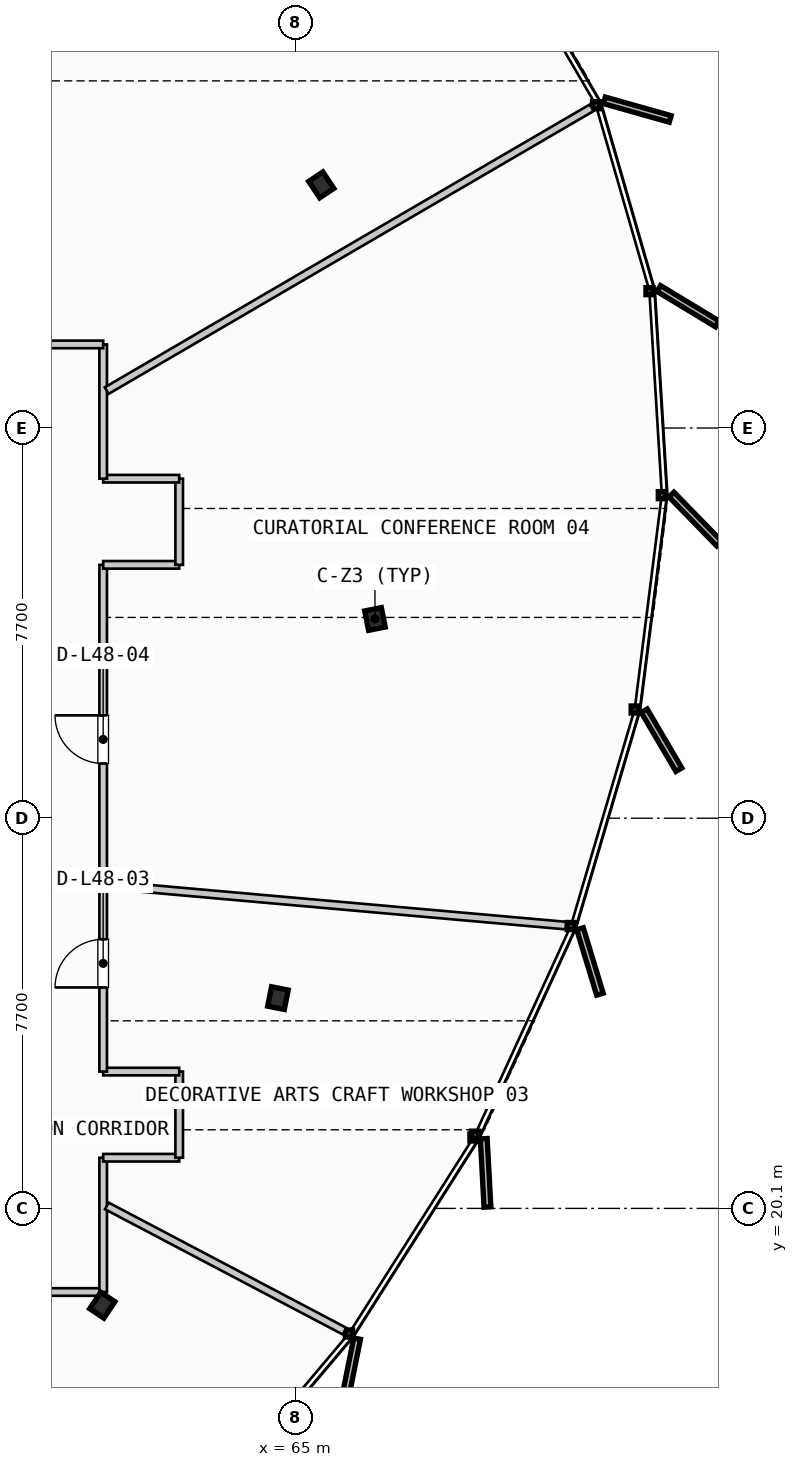
"""IFC4 building model, lengths in metres.
Left out: names, types, materials, properties, quantities, classifications, styles, units other than length and angle.
Written with IfcOpenShell. Run it as: python <this file> out.ifc"""

import sys

from ifc_helpers import new_model, si_unit, direction, frame, frame_2d, origin, origin_2d, place, context, subcontext, project, spatial, rectangle, i_section, extrude, source, transform, mapped, element, fill, save


model = new_model("IFC4")
c1 = context("Model", 3, precision=1e-05, world=origin(), true_north=direction((0.0, 1.0)))
c2 = subcontext(c1, "Body", "Model", "MODEL_VIEW")
j1 = project(units=[si_unit("LENGTHUNIT", "METRE"), si_unit("PLANEANGLEUNIT", "RADIAN")], contexts=[c1])
p1 = place(None, origin())
s1 = spatial("IfcSite", under=j1, at=p1, CompositionType="ELEMENT")
p2 = place(p1, origin())
s2 = spatial("IfcBuilding", under=s1, at=p2, CompositionType="ELEMENT")
p3 = place(p2, frame((0.0, 0.0, 186.9)))
s3 = spatial("IfcBuildingStorey", under=s2, at=p3, CompositionType="ELEMENT", Elevation=186.9)
m1 = source(origin(), c2, "Body", "SweptSolid", [
    extrude(i_section(OverallWidth=0.391, OverallDepth=0.335, WebThickness=0.023, FlangeThickness=0.034, FilletRadius=0.015, at=origin_2d()), origin(), (0.0, 0.0, 1.0), 3.26),
])
for number, where, z_axis, x_axis in (
    (1, (66.564, 31.731, 0.0), (0.0, 0.0, 1.0), (0.981, 0.195, 0.0)),
    (2, (65.504, 40.298, 0.0), (0.0, 0.0, 1.0), (0.831, 0.556, 0.0)),
    (3, (61.183, 18.19, 0.0), (0.0, 0.0, 1.0), (0.831, -0.556, 0.0)),
    (4, (64.649, 24.25, 0.0), (0.0, 0.0, 1.0), (0.981, -0.195, 0.0)),
):
    element("IfcColumn", number, at=place(p3, frame(where, z_axis=z_axis, x_axis=x_axis)), inside=s3, PredefinedType="COLUMN", context=c2, shape_type="MappedRepresentation", body=[
        mapped(m1, transform((0.0, 0.0, 0.0), scale=1.0)),
    ])
p4 = place(p3, frame((32.85, 18.45, 0.0), z_axis=(0.0, 0.0, 1.0), x_axis=(1.0, 0.0, 0.0)))
e5 = element("IfcWall", 5, at=p4, inside=s3, PredefinedType="PARTITIONING", context=c2, shape_type="SweptSolid", body=[
    extrude(rectangle(XDim=28.35, YDim=0.15, at=frame_2d((14.175, 0.0))), origin(), (0.0, 0.0, 1.0), 2.735),
])
p5 = place(p4, frame((5.3, 0.0, 0.0)))
e6 = element("IfcOpeningElement", 6, at=p5, cuts=e5, PredefinedType="OPENING", context=c2, shape_type="SweptSolid", body=[
    extrude(rectangle(XDim=0.95, YDim=2.15, at=frame_2d((0.475, 1.075))), frame((0.0, 0.085, 0.0), z_axis=(0.0, -1.0, 0.0), x_axis=(1.0, 0.0, 0.0)), (0.0, 0.0, 1.0), 0.17),
])
p6 = place(p4, frame((18.888, 0.0, 0.0)))
e7 = element("IfcOpeningElement", 7, at=p6, cuts=e5, PredefinedType="OPENING", context=c2, shape_type="SweptSolid", body=[
    extrude(rectangle(XDim=0.95, YDim=2.15, at=frame_2d((0.475, 1.075))), frame((0.0, 0.085, 0.0), z_axis=(0.0, -1.0, 0.0), x_axis=(1.0, 0.0, 0.0)), (0.0, 0.0, 1.0), 0.17),
])
p7 = place(p3, frame((61.2, 18.45, 0.0), z_axis=(0.0, 0.0, 1.0), x_axis=(0.0, 1.0, 0.0)))
e8 = element("IfcWall", 8, at=p7, inside=s3, PredefinedType="PARTITIONING", context=c2, shape_type="SweptSolid", body=[
    extrude(rectangle(XDim=2.65, YDim=0.15, at=frame_2d((1.325, 0.0))), origin(), (0.0, 0.0, 1.0), 2.735),
])
p8 = place(p3, frame((61.2, 21.1, 0.0), z_axis=(0.0, 0.0, 1.0), x_axis=(1.0, 0.0, 0.0)))
e9 = element("IfcWall", 9, at=p8, inside=s3, PredefinedType="PARTITIONING", context=c2, shape_type="SweptSolid", body=[
    extrude(rectangle(XDim=1.5, YDim=0.15, at=frame_2d((0.75, 0.0))), origin(), (0.0, 0.0, 1.0), 2.735),
])
p9 = place(p3, frame((62.7, 21.1, 0.0), z_axis=(0.0, 0.0, 1.0), x_axis=(0.0, 1.0, 0.0)))
e10 = element("IfcWall", 10, at=p9, inside=s3, PredefinedType="PARTITIONING", context=c2, shape_type="SweptSolid", body=[
    extrude(rectangle(XDim=1.7, YDim=0.15, at=frame_2d((0.85, 0.0))), origin(), (0.0, 0.0, 1.0), 2.735),
])
p10 = place(p3, frame((62.7, 22.8, 0.0), z_axis=(0.0, 0.0, 1.0), x_axis=(-1.0, 0.0, 0.0)))
e11 = element("IfcWall", 11, at=p10, inside=s3, PredefinedType="PARTITIONING", context=c2, shape_type="SweptSolid", body=[
    extrude(rectangle(XDim=1.5, YDim=0.15, at=frame_2d((0.75, 0.0))), origin(), (0.0, 0.0, 1.0), 2.735),
])
p11 = place(p3, frame((61.2, 22.8, 0.0), z_axis=(0.0, 0.0, 1.0), x_axis=(0.0, 1.0, 0.0)))
e12 = element("IfcWall", 12, at=p11, inside=s3, PredefinedType="PARTITIONING", context=c2, shape_type="SweptSolid", body=[
    extrude(rectangle(XDim=10.0, YDim=0.15, at=frame_2d((5.0, 0.0))), origin(), (0.0, 0.0, 1.0), 2.735),
])
p12 = place(p11, frame((1.66, 0.0, 0.0)))
e13 = element("IfcOpeningElement", 13, at=p12, cuts=e12, PredefinedType="OPENING", context=c2, shape_type="SweptSolid", body=[
    extrude(rectangle(XDim=0.95, YDim=2.15, at=frame_2d((0.475, 1.075))), frame((0.0, 0.085, 0.0), z_axis=(0.0, -1.0, 0.0), x_axis=(1.0, 0.0, 0.0)), (0.0, 0.0, 1.0), 0.17),
])
p13 = place(p11, frame((6.08, 0.0, 0.0)))
e14 = element("IfcOpeningElement", 14, at=p13, cuts=e12, PredefinedType="OPENING", context=c2, shape_type="SweptSolid", body=[
    extrude(rectangle(XDim=0.95, YDim=2.15, at=frame_2d((0.475, 1.075))), frame((0.0, 0.085, 0.0), z_axis=(0.0, -1.0, 0.0), x_axis=(1.0, 0.0, 0.0)), (0.0, 0.0, 1.0), 0.17),
])
p14 = place(p3, frame((61.2, 32.8, 0.0), z_axis=(0.0, 0.0, 1.0), x_axis=(1.0, 0.0, 0.0)))
e15 = element("IfcWall", 15, at=p14, inside=s3, PredefinedType="PARTITIONING", context=c2, shape_type="SweptSolid", body=[
    extrude(rectangle(XDim=1.5, YDim=0.15, at=frame_2d((0.75, 0.0))), origin(), (0.0, 0.0, 1.0), 2.735),
])
p15 = place(p3, frame((62.7, 32.8, 0.0), z_axis=(0.0, 0.0, 1.0), x_axis=(0.0, 1.0, 0.0)))
e16 = element("IfcWall", 16, at=p15, inside=s3, PredefinedType="PARTITIONING", context=c2, shape_type="SweptSolid", body=[
    extrude(rectangle(XDim=1.7, YDim=0.15, at=frame_2d((0.85, 0.0))), origin(), (0.0, 0.0, 1.0), 2.735),
])
p16 = place(p3, frame((62.7, 34.5, 0.0), z_axis=(0.0, 0.0, 1.0), x_axis=(-1.0, 0.0, 0.0)))
e17 = element("IfcWall", 17, at=p16, inside=s3, PredefinedType="PARTITIONING", context=c2, shape_type="SweptSolid", body=[
    extrude(rectangle(XDim=1.5, YDim=0.15, at=frame_2d((0.75, 0.0))), origin(), (0.0, 0.0, 1.0), 2.735),
])
p17 = place(p3, frame((61.2, 34.5, 0.0), z_axis=(0.0, 0.0, 1.0), x_axis=(0.0, 1.0, 0.0)))
e18 = element("IfcWall", 18, at=p17, inside=s3, PredefinedType="PARTITIONING", context=c2, shape_type="SweptSolid", body=[
    extrude(rectangle(XDim=2.65, YDim=0.15, at=frame_2d((1.325, 0.0))), origin(), (0.0, 0.0, 1.0), 2.735),
])
p18 = place(p3, frame((61.2, 37.15, 0.0), z_axis=(0.0, 0.0, 1.0), x_axis=(-1.0, 0.0, 0.0)))
e19 = element("IfcWall", 19, at=p18, inside=s3, PredefinedType="PARTITIONING", context=c2, shape_type="SweptSolid", body=[
    extrude(rectangle(XDim=28.35, YDim=0.15, at=frame_2d((14.175, 0.0))), origin(), (0.0, 0.0, 1.0), 2.735),
])
p19 = place(p18, frame((5.38, 0.0, 0.0)))
e20 = element("IfcOpeningElement", 20, at=p19, cuts=e19, PredefinedType="OPENING", context=c2, shape_type="SweptSolid", body=[
    extrude(rectangle(XDim=0.95, YDim=2.15, at=frame_2d((0.475, 1.075))), frame((0.0, 0.085, 0.0), z_axis=(0.0, -1.0, 0.0), x_axis=(1.0, 0.0, 0.0)), (0.0, 0.0, 1.0), 0.17),
])
p20 = place(p18, frame((18.967, 0.0, 0.0)))
e21 = element("IfcOpeningElement", 21, at=p20, cuts=e19, PredefinedType="OPENING", context=c2, shape_type="SweptSolid", body=[
    extrude(rectangle(XDim=0.95, YDim=2.15, at=frame_2d((0.475, 1.075))), frame((0.0, 0.085, 0.0), z_axis=(0.0, -1.0, 0.0), x_axis=(1.0, 0.0, 0.0)), (0.0, 0.0, 1.0), 0.17),
])
p21 = place(p3, frame((61.271, 20.149, 0.0), z_axis=(0.0, 0.0, 1.0), x_axis=(0.884779352256, -0.466010190684, 0.0)))
e22 = element("IfcWall", 22, at=p21, inside=s3, PredefinedType="PARTITIONING", context=c2, shape_type="SweptSolid", body=[
    extrude(rectangle(XDim=5.302, YDim=0.15, at=frame_2d((2.651, 0.0))), origin(), (0.0, 0.0, 1.0), 2.735),
])
p22 = place(p3, frame((61.28, 26.483, 0.0), z_axis=(0.0, 0.0, 1.0), x_axis=(0.996095937169, -0.088277312801, 0.0)))
e23 = element("IfcWall", 23, at=p22, inside=s3, PredefinedType="PARTITIONING", context=c2, shape_type="SweptSolid", body=[
    extrude(rectangle(XDim=9.085, YDim=0.15, at=frame_2d((4.542, 0.0))), origin(), (0.0, 0.0, 1.0), 2.735),
])
p23 = place(p3, frame((61.269, 36.238, 0.0), z_axis=(0.0, 0.0, 1.0), x_axis=(0.863843622528, 0.503760057783, 0.0)))
e24 = element("IfcWall", 24, at=p23, inside=s3, PredefinedType="PARTITIONING", context=c2, shape_type="SweptSolid", body=[
    extrude(rectangle(XDim=11.081, YDim=0.15, at=frame_2d((5.541, 0.0))), origin(), (0.0, 0.0, 1.0), 2.735),
])
m2 = source(origin(), c2, "Body", "SweptSolid", [
    extrude(rectangle(XDim=0.95, YDim=2.15, at=frame_2d((0.475, 1.075))), frame((0.0, 0.025, 0.0), z_axis=(0.0, -1.0, 0.0), x_axis=(1.0, 0.0, 0.0)), (0.0, 0.0, 1.0), 0.05),
])
p24 = place(p12, origin())
e25 = element("IfcDoor", 25, at=p24, inside=s3, OperationType="SINGLE_SWING_LEFT", PredefinedType="DOOR", context=c2, shape_type="MappedRepresentation", body=[
    mapped(m2, transform((0.0, 0.0, 0.0), scale=1.0)),
])
fill(e13, e25)
p25 = place(p13, origin())
e26 = element("IfcDoor", 26, at=p25, inside=s3, OperationType="SINGLE_SWING_RIGHT", PredefinedType="DOOR", context=c2, shape_type="MappedRepresentation", body=[
    mapped(m2, transform((0.0, 0.0, 0.0), scale=1.0)),
])
fill(e14, e26)
save(model, sys.argv[1])
